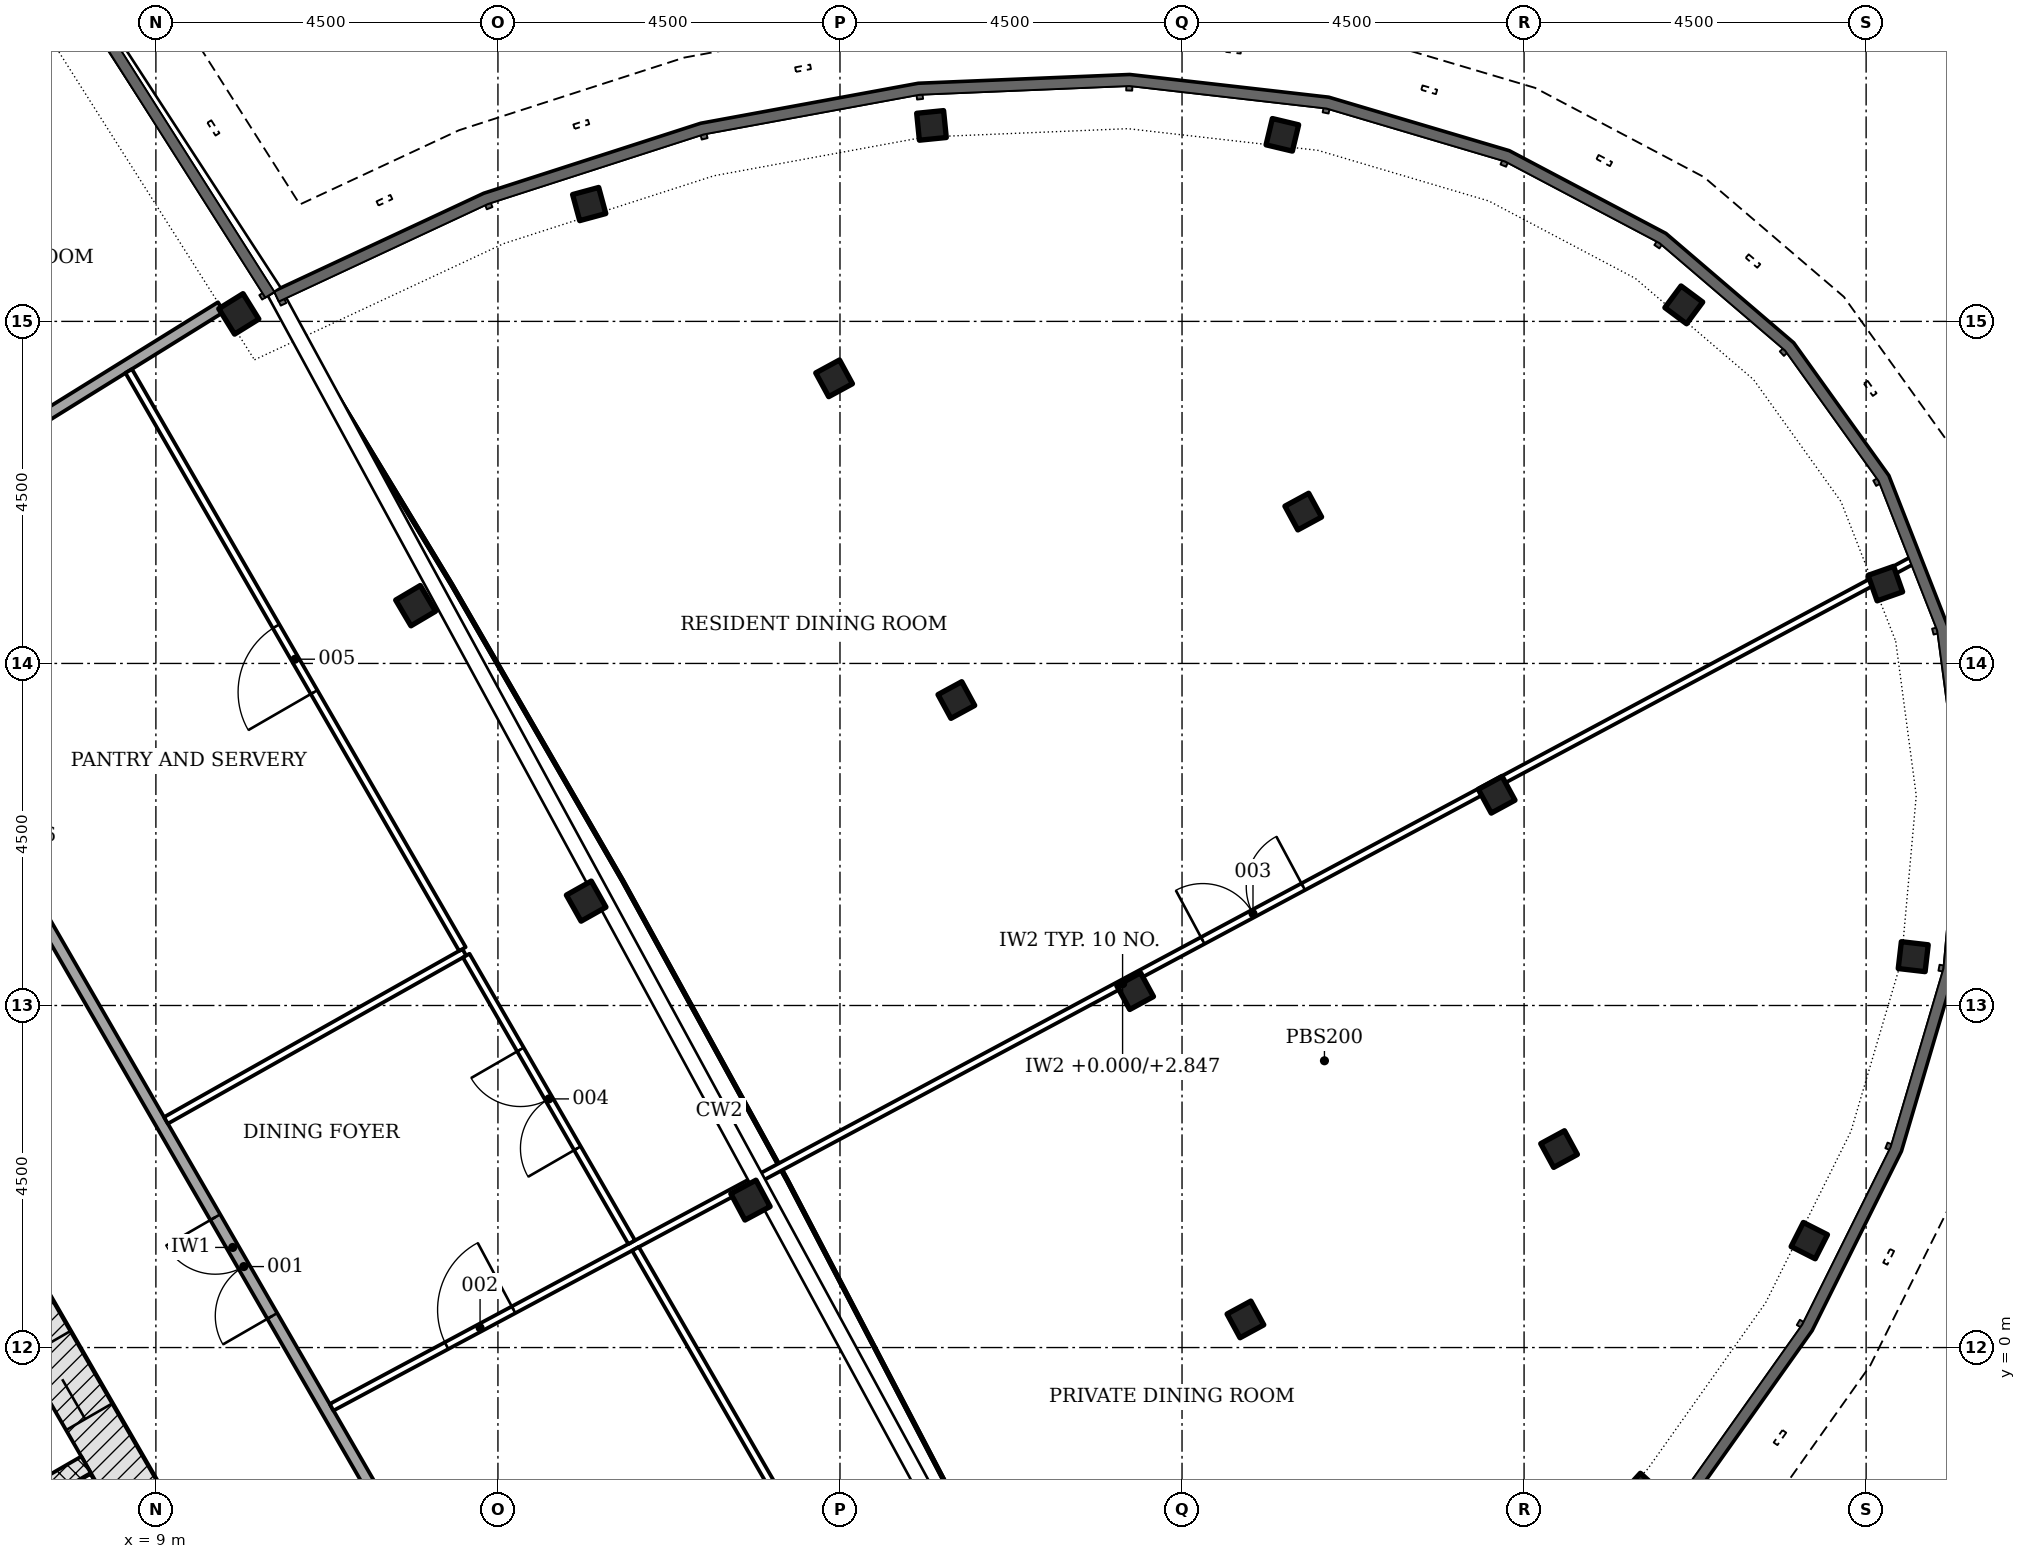
"""IFC4 building model, lengths in metres.
Left out: names, types, materials, properties, quantities, classifications, styles, units other than length and angle.
Written with IfcOpenShell. Run it as: python <this file> out.ifc"""

import sys

from ifc_helpers import new_model, si_unit, direction, frame, frame_2d, origin, origin_2d, place, context, subcontext, project, spatial, rectangle, hollow_rectangle, i_section, extrude, element, fill, save


model = new_model("IFC4")
c1 = context("Model", 3, precision=1e-05, world=origin(), true_north=direction((0.0, 1.0)))
c2 = subcontext(c1, "Body", "Model", "MODEL_VIEW")
j1 = project(units=[si_unit("LENGTHUNIT", "METRE"), si_unit("PLANEANGLEUNIT", "RADIAN")], contexts=[c1])
p1 = place(None, origin())
s1 = spatial("IfcSite", under=j1, at=p1, CompositionType="ELEMENT")
p2 = place(p1, origin())
s2 = spatial("IfcBuilding", under=s1, at=p2, CompositionType="ELEMENT")
p3 = place(p2, frame((0.0, 0.0, 174.3)))
s3 = spatial("IfcBuildingStorey", under=s2, at=p3, CompositionType="ELEMENT", Elevation=174.3)
p4 = place(p3, frame((10.311, -4.703, -0.2), z_axis=(0.0, 0.0, 1.0), x_axis=(-0.500001446645, 0.866024568562, 0.0)))
e1 = element("IfcWall", 1, at=p4, inside=s3, PredefinedType="SHEAR", context=c2, shape_type="SweptSolid", body=[
    extrude(rectangle(XDim=18.458, YDim=0.7, at=frame_2d((9.229, 0.0))), origin(), (0.0, 0.0, 1.0), 3.6),
])
p5 = place(p4, frame((4.379, 0.0, 0.2)))
e2 = element("IfcOpeningElement", 2, at=p5, cuts=e1, PredefinedType="OPENING", context=c2, shape_type="SweptSolid", body=[
    extrude(rectangle(XDim=1.1, YDim=2.1, at=frame_2d((0.55, 1.05))), frame((0.0, 0.36, 0.0), z_axis=(0.0, -1.0, 0.0), x_axis=(1.0, 0.0, 0.0)), (0.0, 0.0, 1.0), 0.72),
])
p6 = place(p4, frame((6.529, 0.0, 0.2)))
e3 = element("IfcOpeningElement", 3, at=p6, cuts=e1, PredefinedType="OPENING", context=c2, shape_type="SweptSolid", body=[
    extrude(rectangle(XDim=1.1, YDim=2.1, at=frame_2d((0.55, 1.05))), frame((0.0, 0.36, 0.0), z_axis=(0.0, -1.0, 0.0), x_axis=(1.0, 0.0, 0.0)), (0.0, 0.0, 1.0), 0.72),
])
p7 = place(p4, frame((8.679, 0.0, 0.2)))
e4 = element("IfcOpeningElement", 4, at=p7, cuts=e1, PredefinedType="OPENING", context=c2, shape_type="SweptSolid", body=[
    extrude(rectangle(XDim=1.1, YDim=2.1, at=frame_2d((0.55, 1.05))), frame((0.0, 0.36, 0.0), z_axis=(0.0, -1.0, 0.0), x_axis=(1.0, 0.0, 0.0)), (0.0, 0.0, 1.0), 0.72),
])
p8 = place(p4, frame((10.829, 0.0, 0.2)))
e5 = element("IfcOpeningElement", 5, at=p8, cuts=e1, PredefinedType="OPENING", context=c2, shape_type="SweptSolid", body=[
    extrude(rectangle(XDim=1.1, YDim=2.1, at=frame_2d((0.55, 1.05))), frame((0.0, 0.36, 0.0), z_axis=(0.0, -1.0, 0.0), x_axis=(1.0, 0.0, 0.0)), (0.0, 0.0, 1.0), 0.72),
])
p9 = place(p4, frame((12.979, 0.0, 0.2)))
e6 = element("IfcOpeningElement", 6, at=p9, cuts=e1, PredefinedType="OPENING", context=c2, shape_type="SweptSolid", body=[
    extrude(rectangle(XDim=1.1, YDim=2.1, at=frame_2d((0.55, 1.05))), frame((0.0, 0.36, 0.0), z_axis=(0.0, -1.0, 0.0), x_axis=(1.0, 0.0, 0.0)), (0.0, 0.0, 1.0), 0.72),
])
for number, where, z_axis, x_axis in (
    (7, (16.822, 1.939, -0.2), (0.0, 0.0, 1.0), (-0.472, 0.881, 0.0)),
    (8, (14.661, 5.873, -0.2), (0.0, 0.0, 1.0), (-0.491, 0.871, 0.0)),
    (9, (12.417, 9.76, -0.2), (0.0, 0.0, 1.0), (-0.509, 0.861, 0.0)),
    (10, (10.091, 13.599, -0.2), (0.0, 0.0, 1.0), (-0.527, 0.85, 0.0)),
):
    element("IfcColumn", number, at=place(p3, frame(where, z_axis=z_axis, x_axis=x_axis)), inside=s3, PredefinedType="COLUMN", context=c2, shape_type="SweptSolid", body=[
        extrude(i_section(OverallWidth=0.394, OverallDepth=0.376, WebThickness=0.017, FlangeThickness=0.028, FilletRadius=0.015, at=origin_2d()), origin(), (0.0, 0.0, 1.0), 3.6),
    ])
for number, where, z_axis, x_axis in (
    (11, (23.334, 0.37, -0.2), (0.0, 0.0, 1.0), (0.879, 0.477, 0.0)),
    (12, (27.46, 2.611, -0.2), (0.0, 0.0, 1.0), (0.879, 0.477, 0.0)),
    (13, (21.883, 4.689, -0.2), (0.0, 0.0, 1.0), (0.879, 0.477, 0.0)),
    (14, (26.639, 7.272, -0.2), (0.0, 0.0, 1.0), (0.879, 0.477, 0.0)),
    (15, (19.531, 8.519, -0.2), (0.0, 0.0, 1.0), (0.879, 0.477, 0.0)),
    (16, (24.095, 10.998, -0.2), (0.0, 0.0, 1.0), (0.879, 0.477, 0.0)),
    (17, (17.922, 12.751, -0.2), (0.0, 0.0, 1.0), (0.879, 0.477, 0.0)),
    (18, (28.542, -1.905, -0.2), (0.0, 0.0, 1.0), (0.674, 0.739, 0.0)),
    (19, (30.752, 1.406, -0.2), (0.0, 0.0, 1.0), (0.453, 0.892, 0.0)),
    (20, (32.12, 5.142, -0.2), (0.0, 0.0, 1.0), (0.115, 0.993, 0.0)),
    (21, (31.753, 10.05, -0.2), (0.0, 0.0, 1.0), (-0.332, 0.943, 0.0)),
    (22, (29.101, 13.718, -0.2), (0.0, 0.0, 1.0), (-0.802, 0.597, 0.0)),
    (23, (23.82, 15.955, -0.2), (0.0, 0.0, 1.0), (-0.973, 0.232, 0.0)),
    (24, (19.204, 16.078, -0.2), (0.0, 0.0, 1.0), (-0.995, -0.099, 0.0)),
    (25, (14.7, 15.044, -0.2), (0.0, 0.0, 1.0), (-0.965, -0.262, 0.0)),
):
    element("IfcColumn", number, at=place(p3, frame(where, z_axis=z_axis, x_axis=x_axis)), inside=s3, PredefinedType="COLUMN", context=c2, shape_type="SweptSolid", body=[
        extrude(hollow_rectangle(XDim=0.356, YDim=0.356, WallThickness=0.013, at=origin_2d()), origin(), (0.0, 0.0, 1.0), 3.6),
    ])
p10 = place(p3, frame((8.081, -1.541, -0.2), z_axis=(0.0, 0.0, 1.0), x_axis=(-0.866022959057, -0.500004234368, 0.0)))
e26 = element("IfcWall", 26, at=p10, inside=s3, PredefinedType="PARTITIONING", context=c2, shape_type="SweptSolid", body=[
    extrude(rectangle(XDim=2.5, YDim=0.25, at=frame_2d((1.25, 0.0))), origin(), (0.0, 0.0, 1.0), 3.6),
])
p11 = place(p3, frame((15.807, -8.722, 0.0), z_axis=(0.0, 0.0, 1.0), x_axis=(-0.500001078133, 0.866024781323, 0.0)))
e27 = element("IfcWall", 27, at=p11, inside=s3, PredefinedType="PARTITIONING", context=c2, shape_type="SweptSolid", body=[
    extrude(rectangle(XDim=23.185, YDim=0.15, at=frame_2d((11.592, 0.0))), origin(), (0.0, 0.0, 1.0), 2.847),
])
p12 = place(p11, frame((10.551, 0.0, 0.0)))
e28 = element("IfcOpeningElement", 28, at=p12, cuts=e27, PredefinedType="OPENING", context=c2, shape_type="SweptSolid", body=[
    extrude(rectangle(XDim=1.5, YDim=2.1, at=frame_2d((0.75, 1.05))), frame((0.0, 0.085, 0.0), z_axis=(0.0, -1.0, 0.0), x_axis=(1.0, 0.0, 0.0)), (0.0, 0.0, 1.0), 0.17),
])
p13 = place(p11, frame((17.335, 0.0, 0.0)))
e29 = element("IfcOpeningElement", 29, at=p13, cuts=e27, PredefinedType="OPENING", context=c2, shape_type="SweptSolid", body=[
    extrude(rectangle(XDim=1.0, YDim=2.1, at=frame_2d((0.5, 1.05))), frame((0.0, 0.085, 0.0), z_axis=(0.0, -1.0, 0.0), x_axis=(1.0, 0.0, 0.0)), (0.0, 0.0, 1.0), 0.17),
])
p14 = place(p3, frame((9.856, 13.688, 0.0), z_axis=(0.0, 0.0, 1.0), x_axis=(-0.849698198213, -0.527269354271, 0.0)))
e30 = element("IfcWall", 30, at=p14, inside=s3, PredefinedType="PARTITIONING", context=c2, shape_type="SweptSolid", body=[
    extrude(rectangle(XDim=5.979, YDim=0.15, at=frame_2d((2.99, 0.0))), origin(), (0.0, 0.0, 1.0), 3.4),
])
p15 = place(p14, frame((3.264, 0.0, 0.0)))
e31 = element("IfcOpeningElement", 31, at=p15, cuts=e30, PredefinedType="OPENING", context=c2, shape_type="SweptSolid", body=[
    extrude(rectangle(XDim=1.0, YDim=2.1, at=frame_2d((0.5, 1.05))), frame((0.0, 0.085, 0.0), z_axis=(0.0, -1.0, 0.0), x_axis=(1.0, 0.0, 0.0)), (0.0, 0.0, 1.0), 0.17),
])
p16 = place(p3, frame((11.312, -0.786, 0.0), z_axis=(0.0, 0.0, 1.0), x_axis=(0.881471822947, 0.472236620087, 0.0)))
e32 = element("IfcWall", 32, at=p16, inside=s3, PredefinedType="PARTITIONING", context=c2, shape_type="SweptSolid", body=[
    extrude(rectangle(XDim=23.611, YDim=0.1, at=frame_2d((11.806, 0.0))), origin(), (0.0, 0.0, 1.0), 2.847),
])
p17 = place(p16, frame((1.716, 0.0, 0.0)))
e33 = element("IfcOpeningElement", 33, at=p17, cuts=e32, PredefinedType="OPENING", context=c2, shape_type="SweptSolid", body=[
    extrude(rectangle(XDim=1.0, YDim=2.1, at=frame_2d((0.5, 1.05))), frame((0.0, 0.06, 0.0), z_axis=(0.0, -1.0, 0.0), x_axis=(1.0, 0.0, 0.0)), (0.0, 0.0, 1.0), 0.12),
])
p18 = place(p16, frame((13.002, 0.0, 0.0)))
e34 = element("IfcOpeningElement", 34, at=p18, cuts=e32, PredefinedType="OPENING", context=c2, shape_type="SweptSolid", body=[
    extrude(rectangle(XDim=1.5, YDim=2.1, at=frame_2d((0.75, 1.05))), frame((0.0, 0.06, 0.0), z_axis=(0.0, -1.0, 0.0), x_axis=(1.0, 0.0, 0.0)), (0.0, 0.0, 1.0), 0.12),
])
p19 = place(p3, frame((9.133, 2.989, 0.0), z_axis=(0.0, 0.0, 1.0), x_axis=(0.871281573597, 0.490783475181, 0.0)))
e35 = element("IfcWall", 35, at=p19, inside=s3, PredefinedType="PARTITIONING", context=c2, shape_type="SweptSolid", body=[
    extrude(rectangle(XDim=4.505, YDim=0.1, at=frame_2d((2.252, 0.0))), origin(), (0.0, 0.0, 1.0), 3.4),
])
p20 = place(p3, frame((22.363, -10.917, 0.0), z_axis=(0.0, 0.0, 1.0), x_axis=(-0.500007103281, 0.866021302664, 0.0)))
e36 = element("IfcWall", 36, at=p20, inside=s3, PredefinedType="PARTITIONING", context=c2, shape_type="SweptSolid", body=[
    extrude(rectangle(XDim=14.106, YDim=0.1, at=frame_2d((7.053, 0.0))), origin(), (0.0, 0.0, 1.0), 2.847),
])
p21 = place(p3, frame((15.259, 1.386, 0.0), z_axis=(0.0, 0.0, 1.0), x_axis=(-0.499999150107, 0.86602589447, 0.0)))
e37 = element("IfcWall", 37, at=p21, inside=s3, PredefinedType="PARTITIONING", context=c2, shape_type="SweptSolid", body=[
    extrude(rectangle(XDim=4.354, YDim=0.1, at=frame_2d((2.177, 0.0))), origin(), (0.0, 0.0, 1.0), 2.847),
])
p22 = place(p21, frame((1.427, 0.0, 0.0)))
e38 = element("IfcOpeningElement", 38, at=p22, cuts=e37, PredefinedType="OPENING", context=c2, shape_type="SweptSolid", body=[
    extrude(rectangle(XDim=1.5, YDim=2.1, at=frame_2d((0.75, 1.05))), frame((0.0, 0.06, 0.0), z_axis=(0.0, -1.0, 0.0), x_axis=(1.0, 0.0, 0.0)), (0.0, 0.0, 1.0), 0.12),
])
p23 = place(p3, frame((13.032, 5.243, 0.0), z_axis=(0.0, 0.0, 1.0), x_axis=(-0.499996840937, 0.866027227663, 0.0)))
e39 = element("IfcWall", 39, at=p23, inside=s3, PredefinedType="PARTITIONING", context=c2, shape_type="SweptSolid", body=[
    extrude(rectangle(XDim=8.78, YDim=0.1, at=frame_2d((4.39, 0.0))), origin(), (0.0, 0.0, 1.0), 2.847),
])
p24 = place(p23, frame((3.903, 0.0, 0.0)))
e40 = element("IfcOpeningElement", 40, at=p24, cuts=e39, PredefinedType="OPENING", context=c2, shape_type="SweptSolid", body=[
    extrude(rectangle(XDim=1.0, YDim=2.1, at=frame_2d((0.5, 1.05))), frame((0.0, 0.06, 0.0), z_axis=(0.0, -1.0, 0.0), x_axis=(1.0, 0.0, 0.0)), (0.0, 0.0, 1.0), 0.12),
])
p25 = place(p5, origin())
e41 = element("IfcDoor", 41, at=p25, inside=s3, OperationType="DOUBLE_DOOR_SLIDING", PredefinedType="DOOR", context=c2, shape_type="SweptSolid", body=[
    extrude(rectangle(XDim=1.1, YDim=2.1, at=frame_2d((0.55, 1.05))), frame((0.0, 0.025, 0.0), z_axis=(0.0, -1.0, 0.0), x_axis=(1.0, 0.0, 0.0)), (0.0, 0.0, 1.0), 0.05),
])
fill(e2, e41)
p26 = place(p12, origin())
e42 = element("IfcDoor", 42, at=p26, inside=s3, OperationType="DOUBLE_DOOR_SINGLE_SWING", PredefinedType="DOOR", context=c2, shape_type="SweptSolid", body=[
    extrude(rectangle(XDim=1.5, YDim=2.1, at=frame_2d((0.75, 1.05))), frame((0.0, 0.025, 0.0), z_axis=(0.0, -1.0, 0.0), x_axis=(1.0, 0.0, 0.0)), (0.0, 0.0, 1.0), 0.05),
])
fill(e28, e42)
p27 = place(p17, origin())
e43 = element("IfcDoor", 43, at=p27, inside=s3, OperationType="SINGLE_SWING_RIGHT", PredefinedType="DOOR", context=c2, shape_type="SweptSolid", body=[
    extrude(rectangle(XDim=1.0, YDim=2.1, at=frame_2d((0.5, 1.05))), frame((0.0, 0.025, 0.0), z_axis=(0.0, -1.0, 0.0), x_axis=(1.0, 0.0, 0.0)), (0.0, 0.0, 1.0), 0.05),
])
fill(e33, e43)
p28 = place(p18, origin())
e44 = element("IfcDoor", 44, at=p28, inside=s3, OperationType="DOUBLE_DOOR_SINGLE_SWING", PredefinedType="DOOR", context=c2, shape_type="SweptSolid", body=[
    extrude(rectangle(XDim=1.5, YDim=2.1, at=frame_2d((0.75, 1.05))), frame((0.0, 0.025, 0.0), z_axis=(0.0, -1.0, 0.0), x_axis=(1.0, 0.0, 0.0)), (0.0, 0.0, 1.0), 0.05),
])
fill(e34, e44)
p29 = place(p22, origin())
e45 = element("IfcDoor", 45, at=p29, inside=s3, OperationType="DOUBLE_DOOR_SINGLE_SWING", PredefinedType="DOOR", context=c2, shape_type="SweptSolid", body=[
    extrude(rectangle(XDim=1.5, YDim=2.1, at=frame_2d((0.75, 1.05))), frame((0.0, 0.025, 0.0), z_axis=(0.0, -1.0, 0.0), x_axis=(1.0, 0.0, 0.0)), (0.0, 0.0, 1.0), 0.05),
])
fill(e38, e45)
p30 = place(p24, origin())
e46 = element("IfcDoor", 46, at=p30, inside=s3, OperationType="SINGLE_SWING_LEFT", PredefinedType="DOOR", context=c2, shape_type="SweptSolid", body=[
    extrude(rectangle(XDim=1.0, YDim=2.1, at=frame_2d((0.5, 1.05))), frame((0.0, 0.025, 0.0), z_axis=(0.0, -1.0, 0.0), x_axis=(1.0, 0.0, 0.0)), (0.0, 0.0, 1.0), 0.05),
])
fill(e40, e46)
save(model, sys.argv[1])
